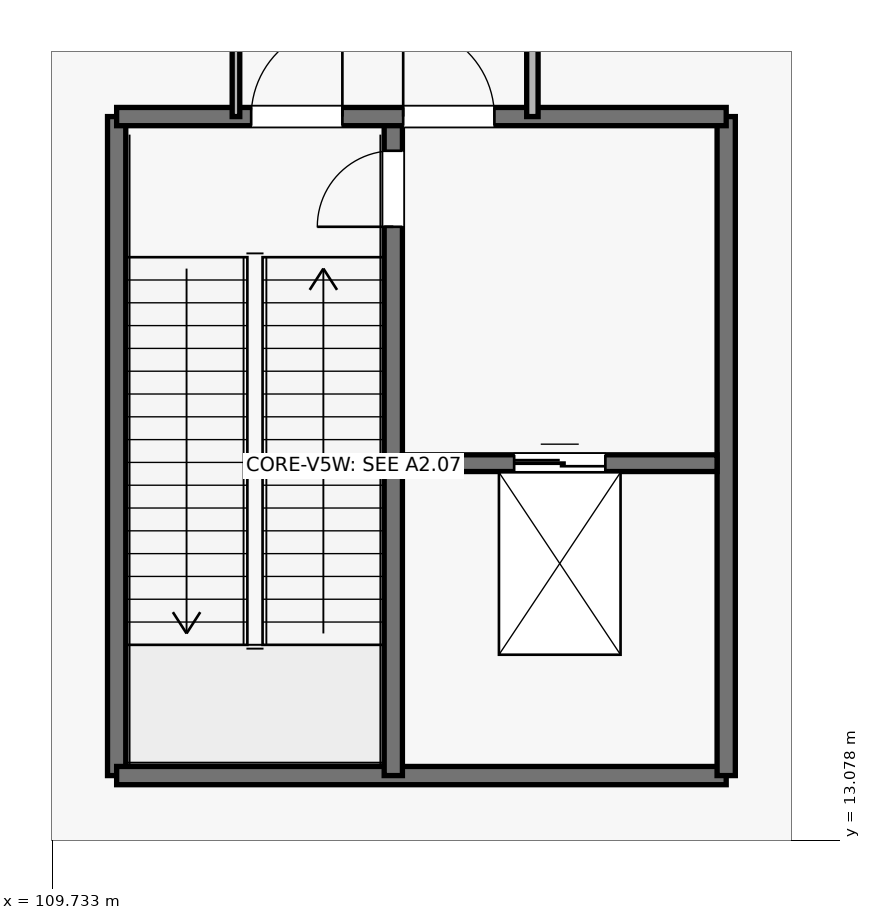
"""IFC4 building model, lengths in metres.
Left out: names, types, materials, properties, quantities, classifications, styles, units other than length and angle.
Written with IfcOpenShell. Run it as: python <this file> out.ifc"""

import sys

from ifc_helpers import new_model, si_unit, direction, frame, frame_2d, origin, place, context, subcontext, project, spatial, rectangle, extrude, element, fill, save


model = new_model("IFC4")
c1 = context("Model", 3, precision=1e-05, world=origin(), true_north=direction((0.0, 1.0)))
c2 = subcontext(c1, "Body", "Model", "MODEL_VIEW")
j1 = project(units=[si_unit("LENGTHUNIT", "METRE"), si_unit("PLANEANGLEUNIT", "RADIAN")], contexts=[c1])
p1 = place(None, origin())
s1 = spatial("IfcSite", under=j1, at=p1, CompositionType="ELEMENT")
p2 = place(p1, origin())
s2 = spatial("IfcBuilding", under=s1, at=p2, CompositionType="ELEMENT")
p3 = place(p2, origin())
s3 = spatial("IfcBuildingStorey", under=s2, at=p3, CompositionType="ELEMENT", Elevation=0.0)
p4 = place(p3, frame((110.58, 22.6, 0.0), z_axis=(0.0, 0.0, 1.0), x_axis=(0.0, -1.0, 0.0)))
e1 = element("IfcWall", 1, at=p4, inside=s3, PredefinedType="SHEAR", context=c2, shape_type="SweptSolid", body=[
    extrude(rectangle(XDim=8.67, YDim=0.24, at=frame_2d((4.335, 0.0))), origin(), (0.0, 0.0, 1.0), 6.26),
])
p5 = place(p3, frame((110.58, 13.93, 0.0), z_axis=(0.0, 0.0, 1.0), x_axis=(1.0, 0.0, 0.0)))
e2 = element("IfcWall", 2, at=p5, inside=s3, PredefinedType="SHEAR", context=c2, shape_type="SweptSolid", body=[
    extrude(rectangle(XDim=8.02, YDim=0.24, at=frame_2d((4.01, 0.0))), origin(), (0.0, 0.0, 1.0), 6.26),
])
p6 = place(p3, frame((114.22, 13.93, 0.0), z_axis=(0.0, 0.0, 1.0), x_axis=(0.0, 1.0, 0.0)))
e3 = element("IfcWall", 3, at=p6, inside=s3, PredefinedType="SHEAR", context=c2, shape_type="SweptSolid", body=[
    extrude(rectangle(XDim=8.67, YDim=0.24, at=frame_2d((4.335, 0.0))), origin(), (0.0, 0.0, 1.0), 6.26),
])
p7 = place(p6, frame((7.22, 0.0, 0.0)))
e4 = element("IfcOpeningElement", 4, at=p7, cuts=e3, PredefinedType="OPENING", context=c2, shape_type="SweptSolid", body=[
    extrude(rectangle(XDim=1.0, YDim=2.2, at=frame_2d((0.5, 1.1))), frame((0.0, 0.135, 0.0), z_axis=(0.0, -1.0, 0.0), x_axis=(1.0, 0.0, 0.0)), (0.0, 0.0, 1.0), 0.27),
])
p8 = place(p3, frame((118.6, 13.93, 0.0), z_axis=(0.0, 0.0, 1.0), x_axis=(0.0, 1.0, 0.0)))
e5 = element("IfcWall", 5, at=p8, inside=s3, PredefinedType="SHEAR", context=c2, shape_type="SweptSolid", body=[
    extrude(rectangle(XDim=8.67, YDim=0.24, at=frame_2d((4.335, 0.0))), origin(), (0.0, 0.0, 1.0), 6.26),
])
p9 = place(p3, frame((110.58, 22.6, 0.0), z_axis=(0.0, 0.0, 1.0), x_axis=(1.0, 0.0, 0.0)))
e6 = element("IfcWall", 6, at=p9, inside=s3, PredefinedType="SHEAR", context=c2, shape_type="SweptSolid", body=[
    extrude(rectangle(XDim=8.02, YDim=0.24, at=frame_2d((4.01, 0.0))), origin(), (0.0, 0.0, 1.0), 6.26),
])
p10 = place(p9, frame((1.77, 0.0, 0.0)))
e7 = element("IfcOpeningElement", 7, at=p10, cuts=e6, PredefinedType="OPENING", context=c2, shape_type="SweptSolid", body=[
    extrude(rectangle(XDim=1.2, YDim=2.2, at=frame_2d((0.6, 1.1))), frame((0.0, 0.135, 0.0), z_axis=(0.0, -1.0, 0.0), x_axis=(1.0, 0.0, 0.0)), (0.0, 0.0, 1.0), 0.27),
])
p11 = place(p9, frame((3.77, 0.0, 0.0)))
e8 = element("IfcOpeningElement", 8, at=p11, cuts=e6, PredefinedType="OPENING", context=c2, shape_type="SweptSolid", body=[
    extrude(rectangle(XDim=1.2, YDim=2.2, at=frame_2d((0.6, 1.1))), frame((0.0, 0.135, 0.0), z_axis=(0.0, -1.0, 0.0), x_axis=(1.0, 0.0, 0.0)), (0.0, 0.0, 1.0), 0.27),
])
p12 = place(p3, frame((114.34, 18.04, 0.0), z_axis=(0.0, 0.0, 1.0), x_axis=(1.0, 0.0, 0.0)))
e9 = element("IfcWall", 9, at=p12, inside=s3, PredefinedType="SHEAR", context=c2, shape_type="SweptSolid", body=[
    extrude(rectangle(XDim=4.14, YDim=0.22, at=frame_2d((2.07, 0.0))), origin(), (0.0, 0.0, 1.0), 6.26),
])
p13 = place(p12, frame((1.47, 0.0, 0.0)))
e10 = element("IfcOpeningElement", 10, at=p13, cuts=e9, PredefinedType="OPENING", context=c2, shape_type="SweptSolid", body=[
    extrude(rectangle(XDim=1.2, YDim=2.2, at=frame_2d((0.6, 1.1))), frame((0.0, 0.125, 0.0), z_axis=(0.0, -1.0, 0.0), x_axis=(1.0, 0.0, 0.0)), (0.0, 0.0, 1.0), 0.25),
])
p14 = place(p3, frame((112.15, 22.6, 0.0), z_axis=(0.0, 0.0, 1.0), x_axis=(0.0, 1.0, 0.0)))
e11 = element("IfcWall", 11, at=p14, inside=s3, PredefinedType="PARTITIONING", context=c2, shape_type="SweptSolid", body=[
    extrude(rectangle(XDim=15.4, YDim=0.1, at=frame_2d((7.7, 0.0))), origin(), (0.0, 0.0, 1.0), 5.303),
])
p15 = place(p14, frame((5.5, 0.0, 0.0)))
e12 = element("IfcOpeningElement", 12, at=p15, cuts=e11, PredefinedType="OPENING", context=c2, shape_type="SweptSolid", body=[
    extrude(rectangle(XDim=1.0, YDim=2.2, at=frame_2d((0.5, 1.1))), frame((0.0, 0.065, 0.0), z_axis=(0.0, -1.0, 0.0), x_axis=(1.0, 0.0, 0.0)), (0.0, 0.0, 1.0), 0.13),
])
p16 = place(p3, frame((116.05, 22.6, 0.0), z_axis=(0.0, 0.0, 1.0), x_axis=(0.0, 1.0, 0.0)))
e13 = element("IfcWall", 13, at=p16, inside=s3, PredefinedType="PARTITIONING", context=c2, shape_type="SweptSolid", body=[
    extrude(rectangle(XDim=15.4, YDim=0.15, at=frame_2d((7.7, 0.0))), origin(), (0.0, 0.0, 1.0), 5.303),
])
p17 = place(p16, frame((5.5, 0.0, 0.0)))
e14 = element("IfcOpeningElement", 14, at=p17, cuts=e13, PredefinedType="OPENING", context=c2, shape_type="SweptSolid", body=[
    extrude(rectangle(XDim=0.9, YDim=2.1, at=frame_2d((0.45, 1.05))), frame((0.0, 0.09, 0.0), z_axis=(0.0, -1.0, 0.0), x_axis=(1.0, 0.0, 0.0)), (0.0, 0.0, 1.0), 0.18),
])
p18 = place(p10, origin())
e15 = element("IfcDoor", 15, at=p18, inside=s3, OperationType="SINGLE_SWING_RIGHT", PredefinedType="DOOR", context=c2, shape_type="SweptSolid", body=[
    extrude(rectangle(XDim=1.2, YDim=2.2, at=frame_2d((0.6, 1.1))), frame((0.0, 0.025, 0.0), z_axis=(0.0, -1.0, 0.0), x_axis=(1.0, 0.0, 0.0)), (0.0, 0.0, 1.0), 0.05),
])
fill(e7, e15)
p19 = place(p11, origin())
e16 = element("IfcDoor", 16, at=p19, inside=s3, OperationType="SINGLE_SWING_LEFT", PredefinedType="DOOR", context=c2, shape_type="SweptSolid", body=[
    extrude(rectangle(XDim=1.2, YDim=2.2, at=frame_2d((0.6, 1.1))), frame((0.0, 0.025, 0.0), z_axis=(0.0, -1.0, 0.0), x_axis=(1.0, 0.0, 0.0)), (0.0, 0.0, 1.0), 0.05),
])
fill(e8, e16)
p20 = place(p7, origin())
e17 = element("IfcDoor", 17, at=p20, inside=s3, OperationType="SINGLE_SWING_LEFT", PredefinedType="DOOR", context=c2, shape_type="SweptSolid", body=[
    extrude(rectangle(XDim=1.0, YDim=2.2, at=frame_2d((0.5, 1.1))), frame((0.0, 0.025, 0.0), z_axis=(0.0, -1.0, 0.0), x_axis=(1.0, 0.0, 0.0)), (0.0, 0.0, 1.0), 0.05),
])
fill(e4, e17)
p21 = place(p13, origin())
e18 = element("IfcDoor", 18, at=p21, inside=s3, OperationType="DOUBLE_DOOR_SLIDING", PredefinedType="DOOR", context=c2, shape_type="SweptSolid", body=[
    extrude(rectangle(XDim=1.2, YDim=2.2, at=frame_2d((0.6, 1.1))), frame((0.0, 0.025, 0.0), z_axis=(0.0, -1.0, 0.0), x_axis=(1.0, 0.0, 0.0)), (0.0, 0.0, 1.0), 0.05),
])
fill(e10, e18)
save(model, sys.argv[1])
